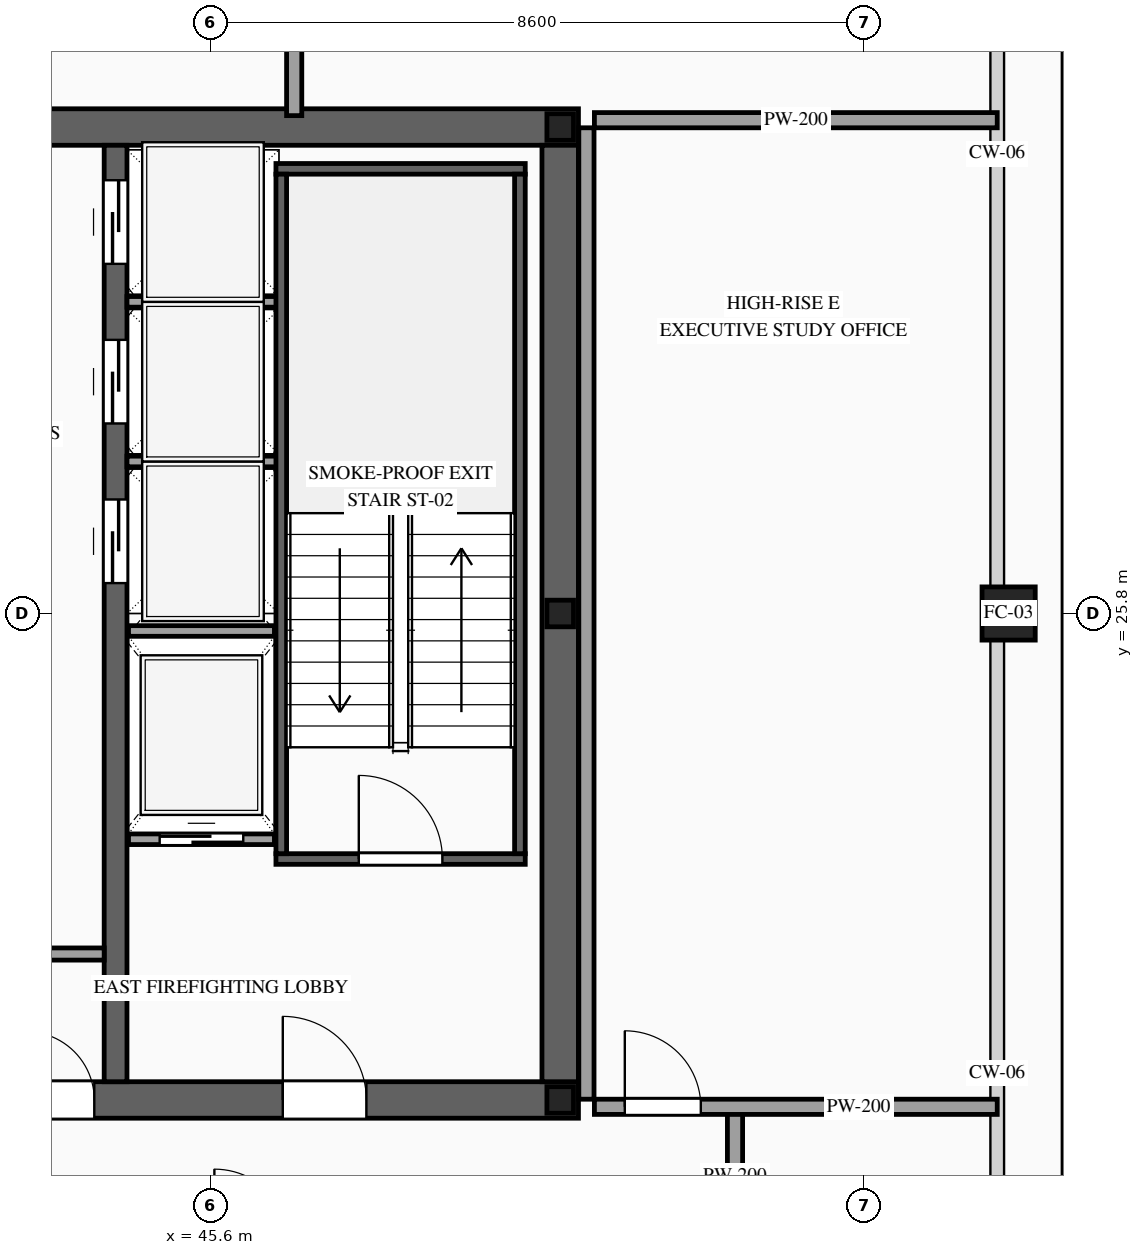
"""IFC4 building model, lengths in metres.
Left out: names, types, materials, properties, quantities, classifications, styles, units other than length and angle.
Written with IfcOpenShell. Run it as: python <this file> out.ifc"""

import sys

from ifc_helpers import new_model, si_unit, direction, frame, frame_2d, origin, origin_2d, place, context, subcontext, project, spatial, rectangle, hollow_rectangle, i_section, extrude, source, transform, mapped, element, fill, save


model = new_model("IFC4")
c1 = context("Model", 3, precision=1e-05, world=origin(), true_north=direction((0.0, 1.0)))
c2 = subcontext(c1, "Body", "Model", "MODEL_VIEW")
j1 = project(units=[si_unit("LENGTHUNIT", "METRE"), si_unit("PLANEANGLEUNIT", "RADIAN")], contexts=[c1])
p1 = place(None, origin())
s1 = spatial("IfcSite", under=j1, at=p1, CompositionType="ELEMENT")
p2 = place(p1, origin())
s2 = spatial("IfcBuilding", under=s1, at=p2, CompositionType="ELEMENT")
p3 = place(p2, frame((0.0, 0.0, 339.2)))
s3 = spatial("IfcBuildingStorey", under=s2, at=p3, CompositionType="ELEMENT", Elevation=339.2)
p4 = place(p3, frame((23.56, 19.4, 0.0), z_axis=(0.0, 0.0, 1.0), x_axis=(1.0, 0.0, 0.0)))
e1 = element("IfcWall", 1, at=p4, inside=s3, PredefinedType="SHEAR", context=c2, shape_type="SweptSolid", body=[
    extrude(rectangle(XDim=26.88, YDim=0.48, at=frame_2d((13.44, 0.0))), origin(), (0.0, 0.0, 1.0), 4.0),
])
p5 = place(p4, frame((1.89, 0.0, 0.0)))
e2 = element("IfcOpeningElement", 2, at=p5, cuts=e1, PredefinedType="OPENING", context=c2, shape_type="SweptSolid", body=[
    extrude(rectangle(XDim=1.1, YDim=2.2, at=frame_2d((0.55, 1.1))), frame((0.0, 0.255, 0.0), z_axis=(0.0, -1.0, 0.0), x_axis=(1.0, 0.0, 0.0)), (0.0, 0.0, 1.0), 0.51),
])
p6 = place(p4, frame((9.79, 0.0, 0.0)))
e3 = element("IfcOpeningElement", 3, at=p6, cuts=e1, PredefinedType="OPENING", context=c2, shape_type="SweptSolid", body=[
    extrude(rectangle(XDim=1.1, YDim=2.2, at=frame_2d((0.55, 1.1))), frame((0.0, 0.255, 0.0), z_axis=(0.0, -1.0, 0.0), x_axis=(1.0, 0.0, 0.0)), (0.0, 0.0, 1.0), 0.51),
])
p7 = place(p4, frame((22.99, 0.0, 0.0)))
e4 = element("IfcOpeningElement", 4, at=p7, cuts=e1, PredefinedType="OPENING", context=c2, shape_type="SweptSolid", body=[
    extrude(rectangle(XDim=1.1, YDim=2.2, at=frame_2d((0.55, 1.1))), frame((0.0, 0.255, 0.0), z_axis=(0.0, -1.0, 0.0), x_axis=(1.0, 0.0, 0.0)), (0.0, 0.0, 1.0), 0.51),
])
p8 = place(p4, frame((19.61, 0.0, 0.0)))
e5 = element("IfcOpeningElement", 5, at=p8, cuts=e1, PredefinedType="OPENING", context=c2, shape_type="SweptSolid", body=[
    extrude(rectangle(XDim=0.9, YDim=2.15, at=frame_2d((0.45, 1.075))), frame((0.0, 0.255, 0.0), z_axis=(0.0, -1.0, 0.0), x_axis=(1.0, 0.0, 0.0)), (0.0, 0.0, 1.0), 0.51),
])
p9 = place(p4, frame((18.17, 0.0, 0.0)))
e6 = element("IfcOpeningElement", 6, at=p9, cuts=e1, PredefinedType="OPENING", context=c2, shape_type="SweptSolid", body=[
    extrude(rectangle(XDim=0.9, YDim=2.15, at=frame_2d((0.45, 1.075))), frame((0.0, 0.255, 0.0), z_axis=(0.0, -1.0, 0.0), x_axis=(1.0, 0.0, 0.0)), (0.0, 0.0, 1.0), 0.51),
])
p10 = place(p3, frame((23.56, 32.2, 0.0), z_axis=(0.0, 0.0, 1.0), x_axis=(1.0, 0.0, 0.0)))
e7 = element("IfcWall", 7, at=p10, inside=s3, PredefinedType="SHEAR", context=c2, shape_type="SweptSolid", body=[
    extrude(rectangle(XDim=26.88, YDim=0.48, at=frame_2d((13.44, 0.0))), origin(), (0.0, 0.0, 1.0), 4.0),
])
p11 = place(p10, frame((4.51, 0.0, 0.0)))
e8 = element("IfcOpeningElement", 8, at=p11, cuts=e7, PredefinedType="OPENING", context=c2, shape_type="SweptSolid", body=[
    extrude(rectangle(XDim=0.9, YDim=2.15, at=frame_2d((0.45, 1.075))), frame((0.0, 0.255, 0.0), z_axis=(0.0, -1.0, 0.0), x_axis=(1.0, 0.0, 0.0)), (0.0, 0.0, 1.0), 0.51),
])
p12 = place(p10, frame((9.79, 0.0, 0.0)))
e9 = element("IfcOpeningElement", 9, at=p12, cuts=e7, PredefinedType="OPENING", context=c2, shape_type="SweptSolid", body=[
    extrude(rectangle(XDim=1.1, YDim=2.2, at=frame_2d((0.55, 1.1))), frame((0.0, 0.255, 0.0), z_axis=(0.0, -1.0, 0.0), x_axis=(1.0, 0.0, 0.0)), (0.0, 0.0, 1.0), 0.51),
])
p13 = place(p10, frame((15.64, 0.0, 0.0)))
e10 = element("IfcOpeningElement", 10, at=p13, cuts=e7, PredefinedType="OPENING", context=c2, shape_type="SweptSolid", body=[
    extrude(rectangle(XDim=1.1, YDim=2.2, at=frame_2d((0.55, 1.1))), frame((0.0, 0.255, 0.0), z_axis=(0.0, -1.0, 0.0), x_axis=(1.0, 0.0, 0.0)), (0.0, 0.0, 1.0), 0.51),
])
p14 = place(p10, frame((18.74, 0.0, 0.0)))
e11 = element("IfcOpeningElement", 11, at=p14, cuts=e7, PredefinedType="OPENING", context=c2, shape_type="SweptSolid", body=[
    extrude(rectangle(XDim=1.1, YDim=2.2, at=frame_2d((0.55, 1.1))), frame((0.0, 0.255, 0.0), z_axis=(0.0, -1.0, 0.0), x_axis=(1.0, 0.0, 0.0)), (0.0, 0.0, 1.0), 0.51),
])
m1 = source(origin(), c2, "Body", "SweptSolid", [
    extrude(rectangle(XDim=12.32, YDim=0.48, at=frame_2d((6.16, 0.0))), origin(), (0.0, 0.0, 1.0), 4.0),
])
p15 = place(p3, frame((50.2, 19.64, 0.0), z_axis=(0.0, 0.0, 1.0), x_axis=(0.0, 1.0, 0.0)))
e12 = element("IfcWall", 12, at=p15, inside=s3, PredefinedType="SHEAR", context=c2, shape_type="MappedRepresentation", body=[
    mapped(m1, transform((0.0, 0.0, 0.0), scale=1.0)),
])
p16 = place(p3, frame((44.35, 19.64, 0.0), z_axis=(0.0, 0.0, 1.0), x_axis=(0.0, 1.0, 0.0)))
e13 = element("IfcWall", 13, at=p16, inside=s3, PredefinedType="SOLIDWALL", context=c2, shape_type="SweptSolid", body=[
    extrude(rectangle(XDim=12.32, YDim=0.3, at=frame_2d((6.16, 0.0))), origin(), (0.0, 0.0, 1.0), 4.0),
])
p17 = place(p16, frame((6.56, 0.0, 0.0)))
e14 = element("IfcOpeningElement", 14, at=p17, cuts=e13, PredefinedType="OPENING", context=c2, shape_type="SweptSolid", body=[
    extrude(rectangle(XDim=1.1, YDim=2.2, at=frame_2d((0.55, 1.1))), frame((0.0, 0.165, 0.0), z_axis=(0.0, -1.0, 0.0), x_axis=(1.0, 0.0, 0.0)), (0.0, 0.0, 1.0), 0.33),
])
p18 = place(p16, frame((8.66, 0.0, 0.0)))
e15 = element("IfcOpeningElement", 15, at=p18, cuts=e13, PredefinedType="OPENING", context=c2, shape_type="SweptSolid", body=[
    extrude(rectangle(XDim=1.1, YDim=2.2, at=frame_2d((0.55, 1.1))), frame((0.0, 0.165, 0.0), z_axis=(0.0, -1.0, 0.0), x_axis=(1.0, 0.0, 0.0)), (0.0, 0.0, 1.0), 0.33),
])
p19 = place(p16, frame((10.76, 0.0, 0.0)))
e16 = element("IfcOpeningElement", 16, at=p19, cuts=e13, PredefinedType="OPENING", context=c2, shape_type="SweptSolid", body=[
    extrude(rectangle(XDim=1.1, YDim=2.2, at=frame_2d((0.55, 1.1))), frame((0.0, 0.165, 0.0), z_axis=(0.0, -1.0, 0.0), x_axis=(1.0, 0.0, 0.0)), (0.0, 0.0, 1.0), 0.33),
])
m2 = source(origin(), c2, "Body", "SweptSolid", [
    extrude(i_section(OverallWidth=0.35, OverallDepth=0.35, WebThickness=0.012, FlangeThickness=0.019, at=origin_2d()), origin(), (0.0, 0.0, 1.0), 4.0),
])
for number, where, z_axis, x_axis in (
    (17, (50.2, 19.4, 0.0), (0.0, 0.0, 1.0), (1.0, 0.0, 0.0)),
    (18, (50.2, 25.8, 0.0), (0.0, 0.0, 1.0), (1.0, 0.0, 0.0)),
    (19, (50.2, 32.2, 0.0), (0.0, 0.0, 1.0), (1.0, 0.0, 0.0)),
):
    element("IfcColumn", number, at=place(p3, frame(where, z_axis=z_axis, x_axis=x_axis)), inside=s3, PredefinedType="COLUMN", context=c2, shape_type="MappedRepresentation", body=[
        mapped(m2, transform((0.0, 0.0, 0.0), scale=1.0)),
    ])
m3 = source(origin(), c2, "Body", "SweptSolid", [
    extrude(hollow_rectangle(XDim=0.7, YDim=0.7, WallThickness=0.032, at=origin_2d()), origin(), (0.0, 0.0, 1.0), 4.0),
])
p20 = place(p3, frame((56.1, 25.8, 0.0), z_axis=(0.0, 0.0, 1.0), x_axis=(1.0, 0.0, 0.0)))
e20 = element("IfcColumn", 20, at=p20, inside=s3, PredefinedType="COLUMN", context=c2, shape_type="MappedRepresentation", body=[
    mapped(m3, transform((0.0, 0.0, 0.0), scale=1.0)),
])
p21 = place(p3, frame((44.52, 22.83, 0.0), z_axis=(0.0, 0.0, 1.0), x_axis=(1.0, 0.0, 0.0)))
e21 = element("IfcWall", 21, at=p21, inside=s3, PredefinedType="SOLIDWALL", context=c2, shape_type="SweptSolid", body=[
    extrude(rectangle(XDim=1.92, YDim=0.14, at=frame_2d((0.96, 0.0))), origin(), (0.0, 0.0, 1.0), 3.76),
])
p22 = place(p21, frame((0.41, 0.0, 0.0)))
e22 = element("IfcOpeningElement", 22, at=p22, cuts=e21, PredefinedType="OPENING", context=c2, shape_type="SweptSolid", body=[
    extrude(rectangle(XDim=1.1, YDim=2.2, at=frame_2d((0.55, 1.1))), frame((0.0, 0.085, 0.0), z_axis=(0.0, -1.0, 0.0), x_axis=(1.0, 0.0, 0.0)), (0.0, 0.0, 1.0), 0.17),
])
m4 = source(origin(), c2, "Body", "SweptSolid", [
    extrude(rectangle(XDim=1.92, YDim=0.14, at=frame_2d((0.96, 0.0))), origin(), (0.0, 0.0, 1.0), 3.76),
])
p23 = place(p3, frame((44.52, 25.57, 0.0), z_axis=(0.0, 0.0, 1.0), x_axis=(1.0, 0.0, 0.0)))
e23 = element("IfcWall", 23, at=p23, inside=s3, PredefinedType="SOLIDWALL", context=c2, shape_type="MappedRepresentation", body=[
    mapped(m4, transform((0.0, 0.0, 0.0), scale=1.0)),
])
m5 = source(origin(), c2, "Body", "SweptSolid", [
    extrude(rectangle(XDim=2.0, YDim=0.14, at=frame_2d((1.0, 0.0))), origin(), (0.0, 0.0, 1.0), 3.76),
])
for number, where, z_axis, x_axis in (
    (24, (44.5, 27.8, 0.0), (0.0, 0.0, 1.0), (1.0, 0.0, 0.0)),
    (25, (44.5, 29.9, 0.0), (0.0, 0.0, 1.0), (1.0, 0.0, 0.0)),
):
    element("IfcWall", number, at=place(p3, frame(where, z_axis=z_axis, x_axis=x_axis)), inside=s3, PredefinedType="SOLIDWALL", context=c2, shape_type="MappedRepresentation", body=[
        mapped(m5, transform((0.0, 0.0, 0.0), scale=1.0)),
    ])
p24 = place(p3, frame((46.46, 22.57, 0.0), z_axis=(0.0, 0.0, 1.0), x_axis=(1.0, 0.0, 0.0)))
e26 = element("IfcWall", 26, at=p24, inside=s3, PredefinedType="SOLIDWALL", context=c2, shape_type="SweptSolid", body=[
    extrude(rectangle(XDim=3.28, YDim=0.14, at=frame_2d((1.64, 0.0))), origin(), (0.0, 0.0, 1.0), 3.76),
])
p25 = place(p24, frame((1.09, 0.0, 0.0)))
e27 = element("IfcOpeningElement", 27, at=p25, cuts=e26, PredefinedType="OPENING", context=c2, shape_type="SweptSolid", body=[
    extrude(rectangle(XDim=1.1, YDim=2.2, at=frame_2d((0.55, 1.1))), frame((0.0, 0.085, 0.0), z_axis=(0.0, -1.0, 0.0), x_axis=(1.0, 0.0, 0.0)), (0.0, 0.0, 1.0), 0.17),
])
m6 = source(origin(), c2, "Body", "SweptSolid", [
    extrude(rectangle(XDim=3.28, YDim=0.14, at=frame_2d((1.64, 0.0))), origin(), (0.0, 0.0, 1.0), 3.76),
])
p26 = place(p3, frame((46.46, 31.65, 0.0), z_axis=(0.0, 0.0, 1.0), x_axis=(1.0, 0.0, 0.0)))
e28 = element("IfcWall", 28, at=p26, inside=s3, PredefinedType="SOLIDWALL", context=c2, shape_type="MappedRepresentation", body=[
    mapped(m6, transform((0.0, 0.0, 0.0), scale=1.0)),
])
m7 = source(origin(), c2, "Body", "SweptSolid", [
    extrude(rectangle(XDim=8.94, YDim=0.14, at=frame_2d((4.47, 0.0))), origin(), (0.0, 0.0, 1.0), 3.76),
])
for number, where, z_axis, x_axis in (
    (29, (46.53, 22.64, 0.0), (0.0, 0.0, 1.0), (0.0, 1.0, 0.0)),
    (30, (49.67, 22.64, 0.0), (0.0, 0.0, 1.0), (0.0, 1.0, 0.0)),
):
    element("IfcWall", number, at=place(p3, frame(where, z_axis=z_axis, x_axis=x_axis)), inside=s3, PredefinedType="SOLIDWALL", context=c2, shape_type="MappedRepresentation", body=[
        mapped(m7, transform((0.0, 0.0, 0.0), scale=1.0)),
    ])
m8 = source(origin(), c2, "Body", "SweptSolid", [
    extrude(rectangle(XDim=1.17, YDim=0.16, at=frame_2d((0.585, 0.0))), origin(), (0.0, 0.0, 1.0), 3.76),
])
p27 = place(p3, frame((43.03, 21.32, 0.0), z_axis=(0.0, 0.0, 1.0), x_axis=(1.0, 0.0, 0.0)))
e31 = element("IfcWall", 31, at=p27, inside=s3, PredefinedType="PARTITIONING", context=c2, shape_type="MappedRepresentation", body=[
    mapped(m8, transform((0.0, 0.0, 0.0), scale=1.0)),
])
m9 = source(origin(), c2, "Body", "SweptSolid", [
    extrude(rectangle(XDim=1.7, YDim=0.2, at=frame_2d((0.85, 0.0))), origin(), (0.0, 0.0, 1.0), 3.76),
])
for number, where, z_axis, x_axis in (
    (32, (46.7, 32.35, 0.0), (0.0, 0.0, 1.0), (0.0, 1.0, 0.0)),
    (33, (52.5, 17.55, 0.0), (0.0, 0.0, 1.0), (0.0, 1.0, 0.0)),
):
    element("IfcWall", number, at=place(p3, frame(where, z_axis=z_axis, x_axis=x_axis)), inside=s3, PredefinedType="PARTITIONING", context=c2, shape_type="MappedRepresentation", body=[
        mapped(m9, transform((0.0, 0.0, 0.0), scale=1.0)),
    ])
p28 = place(p3, frame((50.65, 19.31, 0.0), z_axis=(0.0, 0.0, 1.0), x_axis=(1.0, 0.0, 0.0)))
e34 = element("IfcWall", 34, at=p28, inside=s3, PredefinedType="PARTITIONING", context=c2, shape_type="SweptSolid", body=[
    extrude(rectangle(XDim=5.3, YDim=0.2, at=frame_2d((2.65, 0.0))), origin(), (0.0, 0.0, 1.0), 3.305),
])
p29 = place(p28, frame((0.4, 0.0, 0.0)))
e35 = element("IfcOpeningElement", 35, at=p29, cuts=e34, PredefinedType="OPENING", context=c2, shape_type="SweptSolid", body=[
    extrude(rectangle(XDim=1.0, YDim=2.2, at=frame_2d((0.5, 1.1))), frame((0.0, 0.115, 0.0), z_axis=(0.0, -1.0, 0.0), x_axis=(1.0, 0.0, 0.0)), (0.0, 0.0, 1.0), 0.23),
])
m10 = source(origin(), c2, "Body", "SweptSolid", [
    extrude(rectangle(XDim=5.3, YDim=0.2, at=frame_2d((2.65, 0.0))), origin(), (0.0, 0.0, 1.0), 3.305),
])
p30 = place(p3, frame((50.65, 32.29, 0.0), z_axis=(0.0, 0.0, 1.0), x_axis=(1.0, 0.0, 0.0)))
e36 = element("IfcWall", 36, at=p30, inside=s3, PredefinedType="PARTITIONING", context=c2, shape_type="MappedRepresentation", body=[
    mapped(m10, transform((0.0, 0.0, 0.0), scale=1.0)),
])
m11 = source(origin(), c2, "Body", "SweptSolid", [
    extrude(rectangle(XDim=12.78, YDim=0.2, at=frame_2d((6.39, 0.0))), origin(), (0.0, 0.0, 1.0), 3.76),
])
p31 = place(p3, frame((50.545, 19.41, 0.0), z_axis=(0.0, 0.0, 1.0), x_axis=(0.0, 1.0, 0.0)))
e37 = element("IfcWall", 37, at=p31, inside=s3, PredefinedType="PARTITIONING", context=c2, shape_type="MappedRepresentation", body=[
    mapped(m11, transform((0.0, 0.0, 0.0), scale=1.0)),
])
m12 = source(origin(), c2, "Body", "SweptSolid", [
    extrude(rectangle(XDim=1.1, YDim=2.2, at=frame_2d((0.55, 1.1))), frame((0.0, 0.025, 0.0), z_axis=(0.0, -1.0, 0.0), x_axis=(1.0, 0.0, 0.0)), (0.0, 0.0, 1.0), 0.05),
])
p32 = place(p22, origin())
e38 = element("IfcDoor", 38, at=p32, inside=s3, OperationType="SLIDING_TO_RIGHT", PredefinedType="DOOR", context=c2, shape_type="MappedRepresentation", body=[
    mapped(m12, transform((0.0, 0.0, 0.0), scale=1.0)),
])
fill(e22, e38)
p33 = place(p17, origin())
e39 = element("IfcDoor", 39, at=p33, inside=s3, OperationType="SLIDING_TO_LEFT", PredefinedType="DOOR", context=c2, shape_type="MappedRepresentation", body=[
    mapped(m12, transform((0.0, 0.0, 0.0), scale=1.0)),
])
fill(e14, e39)
p34 = place(p18, origin())
e40 = element("IfcDoor", 40, at=p34, inside=s3, OperationType="SLIDING_TO_RIGHT", PredefinedType="DOOR", context=c2, shape_type="MappedRepresentation", body=[
    mapped(m12, transform((0.0, 0.0, 0.0), scale=1.0)),
])
fill(e15, e40)
p35 = place(p19, origin())
e41 = element("IfcDoor", 41, at=p35, inside=s3, OperationType="SLIDING_TO_LEFT", PredefinedType="DOOR", context=c2, shape_type="MappedRepresentation", body=[
    mapped(m12, transform((0.0, 0.0, 0.0), scale=1.0)),
])
fill(e16, e41)
m13 = source(origin(), c2, "Body", "SweptSolid", [
    extrude(rectangle(XDim=1.1, YDim=2.2, at=frame_2d((0.55, 1.1))), frame((0.0, 0.025, 0.0), z_axis=(0.0, -1.0, 0.0), x_axis=(1.0, 0.0, 0.0)), (0.0, 0.0, 1.0), 0.05),
])
p36 = place(p25, origin())
e42 = element("IfcDoor", 42, at=p36, inside=s3, OperationType="SINGLE_SWING_LEFT", PredefinedType="DOOR", context=c2, shape_type="MappedRepresentation", body=[
    mapped(m13, transform((0.0, 0.0, 0.0), scale=1.0)),
])
fill(e27, e42)
p37 = place(p7, origin())
e43 = element("IfcDoor", 43, at=p37, inside=s3, OperationType="SINGLE_SWING_LEFT", PredefinedType="DOOR", context=c2, shape_type="MappedRepresentation", body=[
    mapped(m13, transform((0.0, 0.0, 0.0), scale=1.0)),
])
fill(e4, e43)
m14 = source(origin(), c2, "Body", "SweptSolid", [
    extrude(rectangle(XDim=0.9, YDim=2.15, at=frame_2d((0.45, 1.075))), frame((0.0, 0.025, 0.0), z_axis=(0.0, -1.0, 0.0), x_axis=(1.0, 0.0, 0.0)), (0.0, 0.0, 1.0), 0.05),
])
p38 = place(p8, origin())
e44 = element("IfcDoor", 44, at=p38, inside=s3, OperationType="SINGLE_SWING_LEFT", PredefinedType="DOOR", context=c2, shape_type="MappedRepresentation", body=[
    mapped(m14, transform((0.0, 0.0, 0.0), scale=1.0)),
])
fill(e5, e44)
m15 = source(origin(), c2, "Body", "SweptSolid", [
    extrude(rectangle(XDim=1.0, YDim=2.2, at=frame_2d((0.5, 1.1))), frame((0.0, 0.025, 0.0), z_axis=(0.0, -1.0, 0.0), x_axis=(1.0, 0.0, 0.0)), (0.0, 0.0, 1.0), 0.05),
])
p39 = place(p29, origin())
e45 = element("IfcDoor", 45, at=p39, inside=s3, OperationType="SINGLE_SWING_LEFT", PredefinedType="DOOR", context=c2, shape_type="MappedRepresentation", body=[
    mapped(m15, transform((0.0, 0.0, 0.0), scale=1.0)),
])
fill(e35, e45)
save(model, sys.argv[1])
